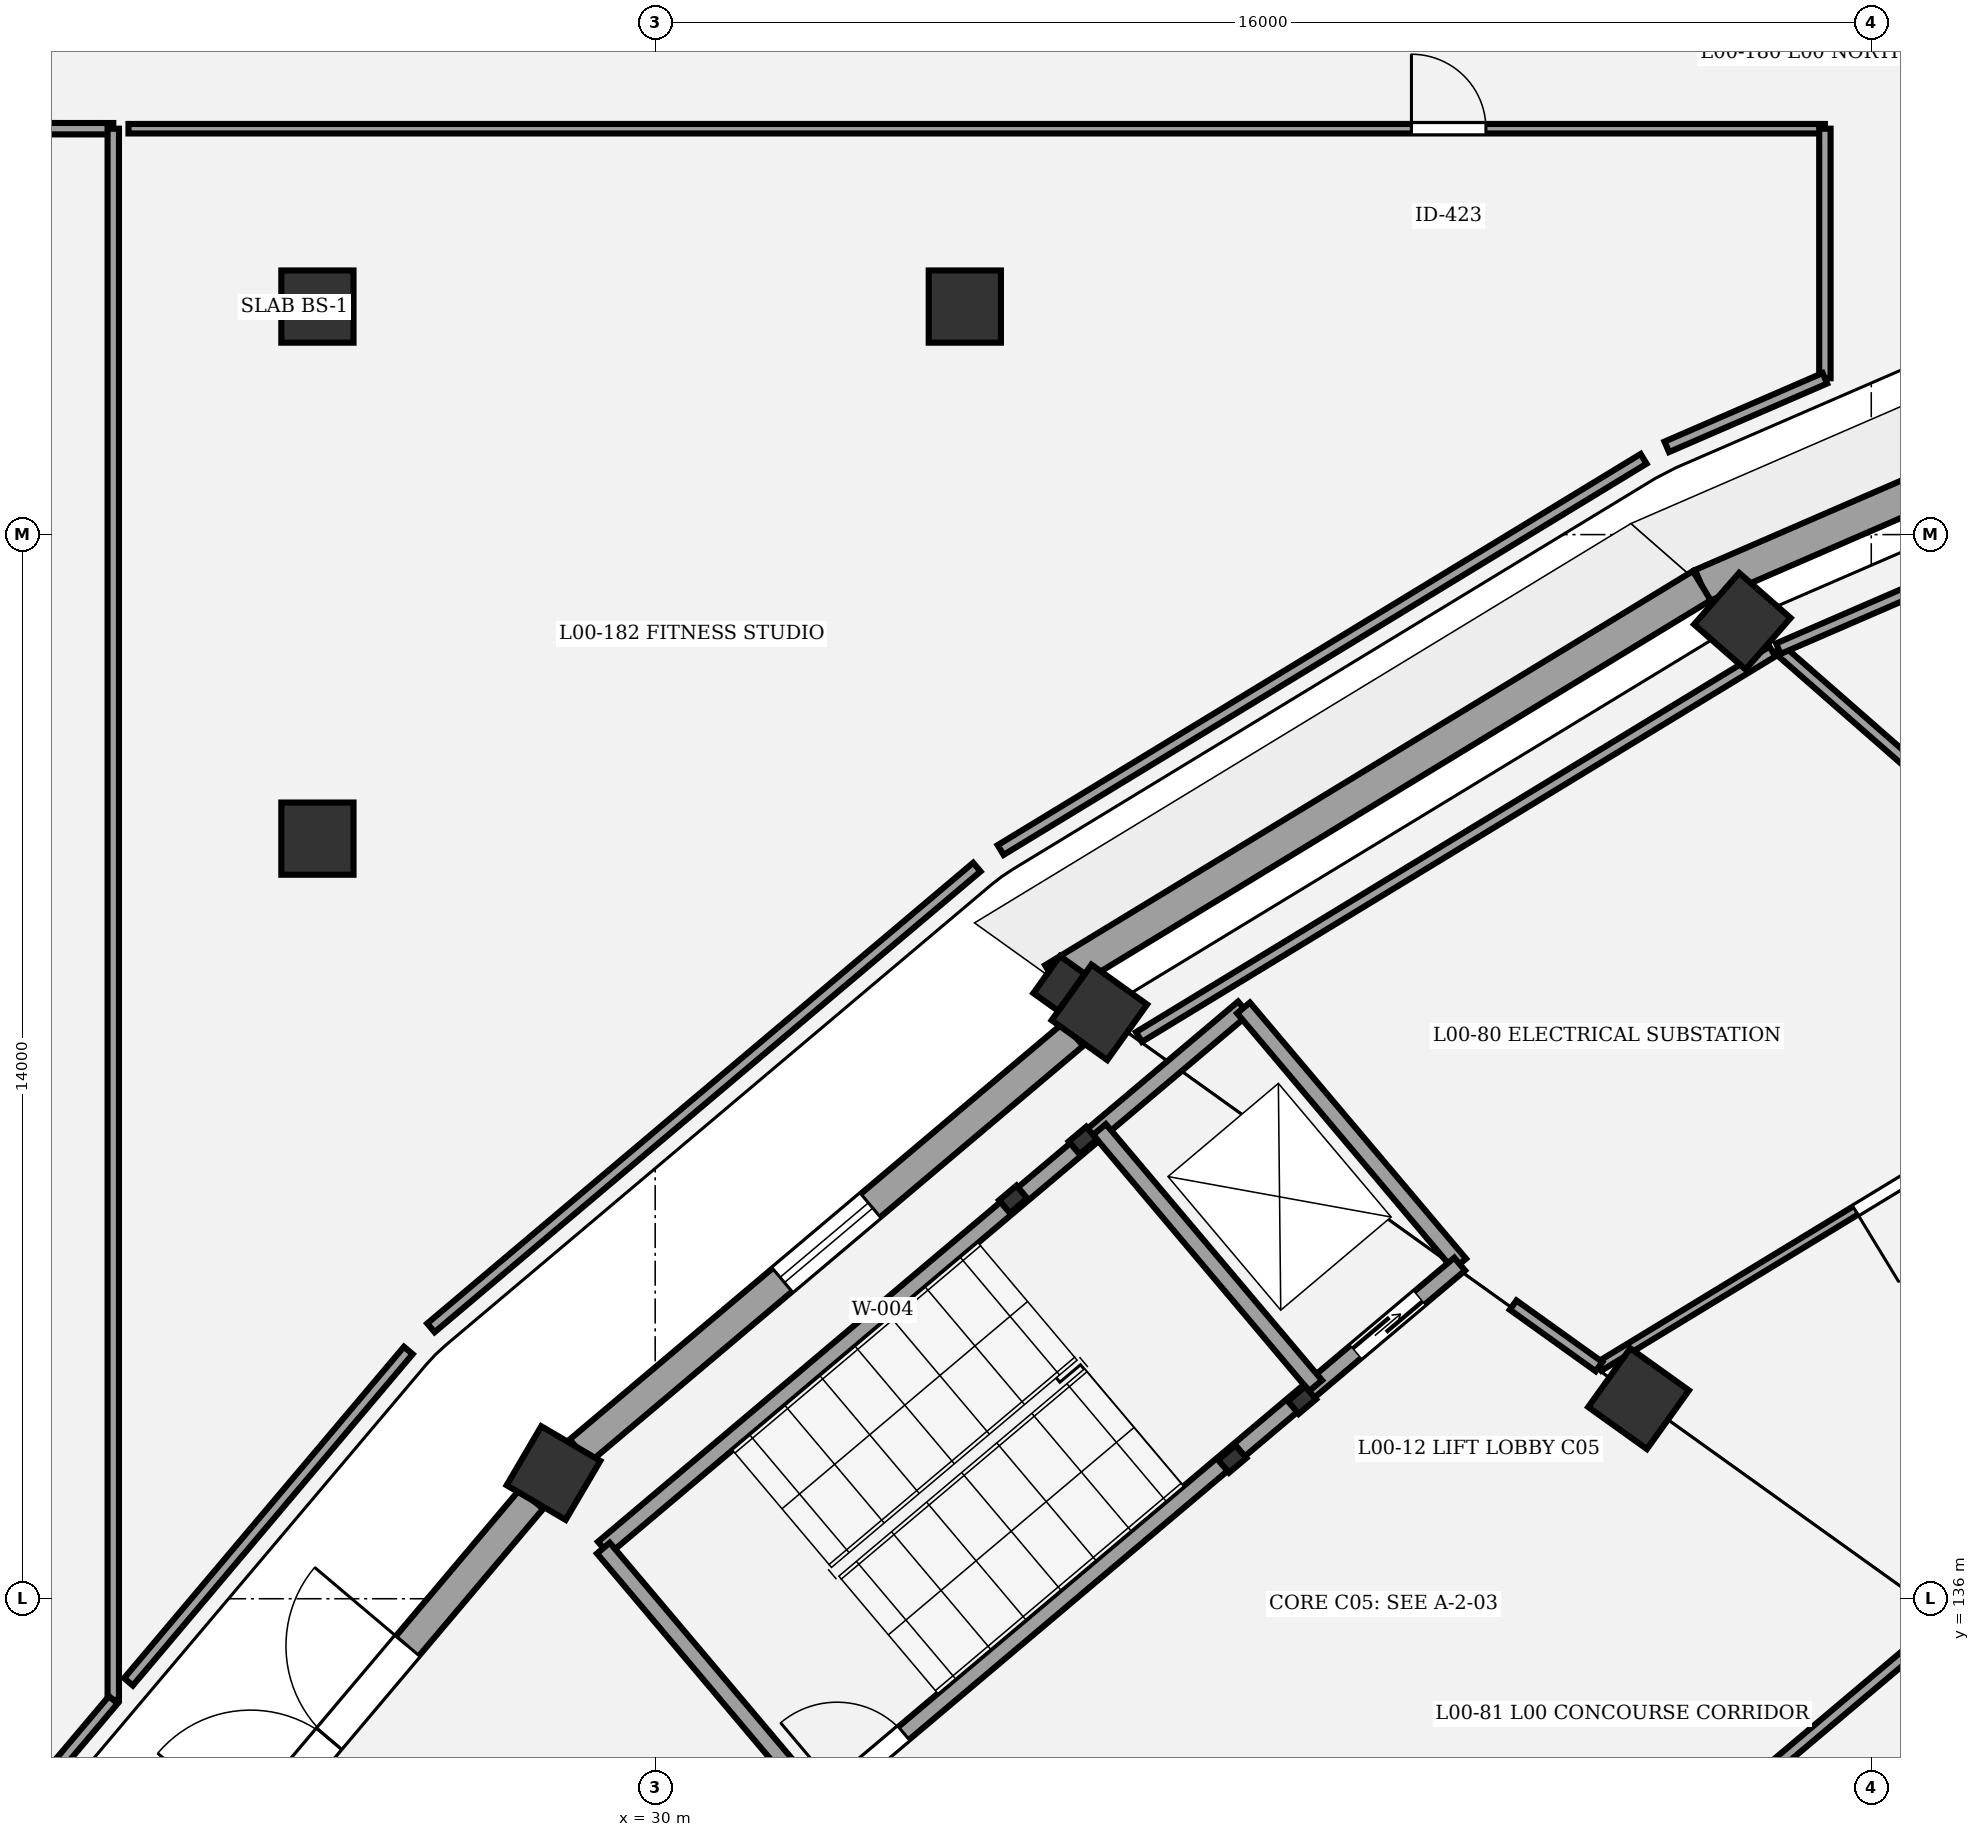
"""IFC4 building model, lengths in metres.
Left out: names, types, materials, properties, quantities, classifications, styles, units other than length and angle.
Written with IfcOpenShell. Run it as: python <this file> out.ifc"""

import sys

from ifc_helpers import new_model, si_unit, direction, frame, frame_2d, origin, origin_2d, place, context, subcontext, project, spatial, rectangle, circle, extrude, element, fill, save


model = new_model("IFC4")
c1 = context("Model", 3, precision=1e-05, world=origin(), true_north=direction((0.0, 1.0)))
c2 = subcontext(c1, "Body", "Model", "MODEL_VIEW")
j1 = project(units=[si_unit("LENGTHUNIT", "METRE"), si_unit("PLANEANGLEUNIT", "RADIAN")], contexts=[c1])
p1 = place(None, origin())
s1 = spatial("IfcSite", under=j1, at=p1, CompositionType="ELEMENT")
p2 = place(p1, origin())
s2 = spatial("IfcBuilding", under=s1, at=p2, CompositionType="ELEMENT")
p3 = place(p2, origin())
s3 = spatial("IfcBuildingStorey", under=s2, at=p3, CompositionType="ELEMENT", Elevation=0.0)
p4 = place(p3, frame((44.304, 148.861, 0.0), z_axis=(0.0, 0.0, 1.0), x_axis=(-0.752529860433, 0.658558128912, 0.0)))
e1 = element("IfcColumn", 1, at=p4, inside=s3, PredefinedType="COLUMN", context=c2, shape_type="SweptSolid", body=[
    extrude(rectangle(XDim=0.9, YDim=0.9, at=origin_2d()), origin(), (0.0, 0.0, 1.0), 5.4),
])
p5 = place(p3, frame((42.939, 138.632, 0.0), z_axis=(0.0, 0.0, 1.0), x_axis=(-0.812897512265, 0.582406760395, 0.0)))
e2 = element("IfcColumn", 2, at=p5, inside=s3, PredefinedType="COLUMN", context=c2, shape_type="SweptSolid", body=[
    extrude(rectangle(XDim=0.95, YDim=0.95, at=origin_2d()), origin(), (0.0, 0.0, 1.0), 5.4),
])
p6 = place(p3, frame((35.844, 143.715, 0.0), z_axis=(0.0, 0.0, 1.0), x_axis=(-0.812897512265, 0.582406760395, 0.0)))
e3 = element("IfcColumn", 3, at=p6, inside=s3, PredefinedType="COLUMN", context=c2, shape_type="SweptSolid", body=[
    extrude(rectangle(XDim=0.9, YDim=0.9, at=origin_2d()), origin(), (0.0, 0.0, 1.0), 5.4),
])
p7 = place(p3, frame((35.314, 144.095, 0.0), z_axis=(0.0, 0.0, 1.0), x_axis=(-0.582406760395, -0.812897512265, 0.0)))
e4 = element("IfcColumn", 4, at=p7, inside=s3, PredefinedType="PILASTER", context=c2, shape_type="SweptSolid", body=[
    extrude(rectangle(XDim=0.6, YDim=0.4, at=origin_2d()), origin(), (0.0, 0.0, 1.0), 5.4),
])
p8 = place(p3, frame((28.662, 137.654, 0.0), z_axis=(0.0, 0.0, 1.0), x_axis=(-0.862513669207, 0.506033764121, 0.0)))
e5 = element("IfcColumn", 5, at=p8, inside=s3, PredefinedType="COLUMN", context=c2, shape_type="SweptSolid", body=[
    extrude(rectangle(XDim=0.9, YDim=0.9, at=origin_2d()), origin(), (0.0, 0.0, 1.0), 5.4),
])
for number, where, z_axis, x_axis in (
    (6, (25.556, 146.0, 0.0), (0.0, 0.0, 1.0), (1.0, 0.0, 0.0)),
    (7, (25.556, 153.0, 0.0), (0.0, 0.0, 1.0), (1.0, 0.0, 0.0)),
    (8, (34.074, 153.0, 0.0), (0.0, 0.0, 1.0), (1.0, 0.0, 0.0)),
):
    element("IfcColumn", number, at=place(p3, frame(where, z_axis=z_axis, x_axis=x_axis)), inside=s3, PredefinedType="COLUMN", context=c2, shape_type="SweptSolid", body=[
        extrude(circle(Radius=0.475, at=origin_2d()), origin(), (0.0, 0.0, 1.0), 5.4),
    ])
p9 = place(p3, frame((53.603, 153.59, 0.0), z_axis=(0.0, 0.0, 1.0), x_axis=(-0.917502700529, -0.397729549471, 0.0)))
e9 = element("IfcWall", 9, at=p9, inside=s3, PredefinedType="USERDEFINED", context=c2, shape_type="SweptSolid", body=[
    extrude(rectangle(XDim=10.716, YDim=0.45, at=frame_2d((5.358, 0.0))), origin(), (0.0, 0.0, 1.0), 4.25),
])
p10 = place(p3, frame((43.77, 149.328, 0.0), z_axis=(0.0, 0.0, 1.0), x_axis=(-0.854319977813, -0.519747415106, 0.0)))
e10 = element("IfcWall", 10, at=p10, inside=s3, PredefinedType="USERDEFINED", context=c2, shape_type="SweptSolid", body=[
    extrude(rectangle(XDim=9.977, YDim=0.45, at=frame_2d((4.988, 0.0))), origin(), (0.0, 0.0, 1.0), 4.25),
])
p11 = place(p3, frame((29.004, 137.942, 0.0), z_axis=(0.0, 0.0, 1.0), x_axis=(0.764254773348, 0.644914445035, 0.0)))
e11 = element("IfcWall", 11, at=p11, inside=s3, PredefinedType="STANDARD", context=c2, shape_type="SweptSolid", body=[
    extrude(rectangle(XDim=8.502, YDim=0.4, at=frame_2d((4.251, 0.0))), origin(), (0.0, 0.0, 1.0), 4.25),
])
p12 = place(p11, frame((3.491, 0.0, 1.1)))
e12 = element("IfcOpeningElement", 12, at=p12, cuts=e11, PredefinedType="OPENING", context=c2, shape_type="SweptSolid", body=[
    extrude(rectangle(XDim=1.52, YDim=1.55, at=frame_2d((0.76, 0.775))), frame((0.0, 0.21, 0.0), z_axis=(0.0, -1.0, 0.0), x_axis=(1.0, 0.0, 0.0)), (0.0, 0.0, 1.0), 0.42),
])
p13 = place(p3, frame((23.046, 131.004, 0.0), z_axis=(0.0, 0.0, 1.0), x_axis=(0.645194244502, 0.764018577563, 0.0)))
e13 = element("IfcWall", 13, at=p13, inside=s3, PredefinedType="STANDARD", context=c2, shape_type="SweptSolid", body=[
    extrude(rectangle(XDim=8.256, YDim=0.4, at=frame_2d((4.128, 0.0))), origin(), (0.0, 0.0, 1.0), 4.25),
])
p14 = place(p13, frame((2.528, 0.0, 0.0)))
e14 = element("IfcOpeningElement", 14, at=p14, cuts=e13, PredefinedType="OPENING", context=c2, shape_type="SweptSolid", body=[
    extrude(rectangle(XDim=3.2, YDim=3.1, at=frame_2d((1.6, 1.55))), frame((0.0, 0.21, 0.0), z_axis=(0.0, -1.0, 0.0), x_axis=(1.0, 0.0, 0.0)), (0.0, 0.0, 1.0), 0.42),
])
for number, where, z_axis, x_axis in (
    (15, (37.593, 137.839, 0.0), (0.0, 0.0, 1.0), (0.764, 0.645, 0.0)),
    (16, (38.51, 138.613, 0.0), (0.0, 0.0, 1.0), (0.764, 0.645, 0.0)),
    (17, (35.627, 142.029, 0.0), (0.0, 0.0, 1.0), (0.764, 0.645, 0.0)),
    (18, (34.71, 141.255, 0.0), (0.0, 0.0, 1.0), (0.764, 0.645, 0.0)),
):
    element("IfcColumn", number, at=place(p3, frame(where, z_axis=z_axis, x_axis=x_axis)), inside=s3, PredefinedType="COLUMN", context=c2, shape_type="SweptSolid", body=[
        extrude(rectangle(XDim=0.3, YDim=0.22, at=origin_2d()), origin(), (0.0, 0.0, 1.0), 5.4),
    ])
p15 = place(p3, frame((29.319, 136.666, 0.0), z_axis=(0.0, 0.0, 1.0), x_axis=(0.764247804305, 0.644922703598, 0.0)))
e19 = element("IfcWall", 19, at=p15, inside=s3, PredefinedType="SHEAR", context=c2, shape_type="SweptSolid", body=[
    extrude(rectangle(XDim=11.02, YDim=0.22, at=frame_2d((5.51, 0.0))), origin(), (0.0, 0.0, 1.0), 5.15),
])
p16 = place(p3, frame((32.163, 133.296, 0.0), z_axis=(0.0, 0.0, 1.0), x_axis=(-0.644904288042, 0.764263344185, 0.0)))
e20 = element("IfcWall", 20, at=p16, inside=s3, PredefinedType="SHEAR", context=c2, shape_type="SweptSolid", body=[
    extrude(rectangle(XDim=4.41, YDim=0.22, at=frame_2d((2.205, 0.0))), origin(), (0.0, 0.0, 1.0), 5.15),
])
p17 = place(p3, frame((40.585, 140.403, 0.0), z_axis=(0.0, 0.0, 1.0), x_axis=(-0.644936622785, 0.764236058159, 0.0)))
e21 = element("IfcWall", 21, at=p17, inside=s3, PredefinedType="SHEAR", context=c2, shape_type="SweptSolid", body=[
    extrude(rectangle(XDim=4.41, YDim=0.22, at=frame_2d((2.205, 0.0))), origin(), (0.0, 0.0, 1.0), 5.15),
])
p18 = place(p3, frame((32.163, 133.296, 0.0), z_axis=(0.0, 0.0, 1.0), x_axis=(0.764257018762, 0.644911784102, 0.0)))
e22 = element("IfcWall", 22, at=p18, inside=s3, PredefinedType="SHEAR", context=c2, shape_type="SweptSolid", body=[
    extrude(rectangle(XDim=11.02, YDim=0.22, at=frame_2d((5.51, 0.0))), origin(), (0.0, 0.0, 1.0), 5.15),
])
p19 = place(p18, frame((0.3, 0.0, 0.0)))
e23 = element("IfcOpeningElement", 23, at=p19, cuts=e22, PredefinedType="OPENING", context=c2, shape_type="SweptSolid", body=[
    extrude(rectangle(XDim=1.15, YDim=2.15, at=frame_2d((0.575, 1.075))), frame((0.0, 0.12, 0.0), z_axis=(0.0, -1.0, 0.0), x_axis=(1.0, 0.0, 0.0)), (0.0, 0.0, 1.0), 0.24),
])
p20 = place(p18, frame((9.23, 0.0, 0.0)))
e24 = element("IfcOpeningElement", 24, at=p20, cuts=e22, PredefinedType="OPENING", context=c2, shape_type="SweptSolid", body=[
    extrude(rectangle(XDim=1.1, YDim=2.15, at=frame_2d((0.55, 1.075))), frame((0.0, 0.12, 0.0), z_axis=(0.0, -1.0, 0.0), x_axis=(1.0, 0.0, 0.0)), (0.0, 0.0, 1.0), 0.24),
])
p21 = place(p3, frame((38.689, 138.803, 0.0), z_axis=(0.0, 0.0, 1.0), x_axis=(-0.644904288042, 0.764263344185, 0.0)))
e25 = element("IfcWall", 25, at=p21, inside=s3, PredefinedType="SHEAR", context=c2, shape_type="SweptSolid", body=[
    extrude(rectangle(XDim=4.41, YDim=0.22, at=frame_2d((2.205, 0.0))), origin(), (0.0, 0.0, 1.0), 5.15),
])
p22 = place(p3, frame((50.105, 143.731, 0.0), z_axis=(0.0, 0.0, 1.0), x_axis=(-0.854321649351, -0.519744667554, 0.0)))
e26 = element("IfcWall", 26, at=p22, inside=s3, PredefinedType="PARTITIONING", context=c2, shape_type="SweptSolid", body=[
    extrude(rectangle(XDim=8.999, YDim=0.125, at=frame_2d((4.499, 0.0))), origin(), (0.0, 0.0, 1.0), 4.15),
])
p23 = place(p22, frame((3.949, 0.0, 0.0)))
e27 = element("IfcOpeningElement", 27, at=p23, cuts=e26, PredefinedType="OPENING", context=c2, shape_type="SweptSolid", body=[
    extrude(rectangle(XDim=1.1, YDim=2.3, at=frame_2d((0.55, 1.15))), frame((0.0, 0.073, 0.0), z_axis=(0.0, -1.0, 0.0), x_axis=(1.0, 0.0, 0.0)), (0.0, 0.0, 1.0), 0.145),
])
p24 = place(p3, frame((40.867, 130.539, 0.0), z_axis=(0.0, 0.0, 1.0), x_axis=(0.764249122867, 0.644921141068, 0.0)))
e28 = element("IfcWall", 28, at=p24, inside=s3, PredefinedType="PARTITIONING", context=c2, shape_type="SweptSolid", body=[
    extrude(rectangle(XDim=7.99, YDim=0.15, at=frame_2d((3.995, 0.0))), origin(), (0.0, 0.0, 1.0), 4.15),
])
p25 = place(p24, frame((1.562, 0.0, 0.0)))
e29 = element("IfcOpeningElement", 29, at=p25, cuts=e28, PredefinedType="OPENING", context=c2, shape_type="SweptSolid", body=[
    extrude(rectangle(XDim=1.14, YDim=2.3, at=frame_2d((0.57, 1.15))), frame((0.0, 0.085, 0.0), z_axis=(0.0, -1.0, 0.0), x_axis=(1.0, 0.0, 0.0)), (0.0, 0.0, 1.0), 0.17),
])
p26 = place(p3, frame((13.469, 155.343, 0.0), z_axis=(0.0, 0.0, 1.0), x_axis=(0.999999951445, -0.000311623544, 0.0)))
e30 = element("IfcWall", 30, at=p26, inside=s3, PredefinedType="PARTITIONING", context=c2, shape_type="SweptSolid", body=[
    extrude(rectangle(XDim=9.401, YDim=0.15, at=frame_2d((4.701, 0.0))), origin(), (0.0, 0.0, 1.0), 4.15),
])
p27 = place(p26, frame((7.203, 0.0, 0.0)))
e31 = element("IfcOpeningElement", 31, at=p27, cuts=e30, PredefinedType="OPENING", context=c2, shape_type="SweptSolid", body=[
    extrude(rectangle(XDim=0.94, YDim=2.3, at=frame_2d((0.47, 1.15))), frame((0.0, 0.085, 0.0), z_axis=(0.0, -1.0, 0.0), x_axis=(1.0, 0.0, 0.0)), (0.0, 0.0, 1.0), 0.17),
])
p28 = place(p3, frame((23.07, 155.34, 0.0), z_axis=(0.0, 0.0, 1.0), x_axis=(1.0, 0.0, 0.0)))
e32 = element("IfcWall", 32, at=p28, inside=s3, PredefinedType="PARTITIONING", context=c2, shape_type="SweptSolid", body=[
    extrude(rectangle(XDim=22.32, YDim=0.125, at=frame_2d((11.16, 0.0))), origin(), (0.0, 0.0, 1.0), 4.15),
])
p29 = place(p28, frame((16.88, 0.0, 0.0)))
e33 = element("IfcOpeningElement", 33, at=p29, cuts=e32, PredefinedType="OPENING", context=c2, shape_type="SweptSolid", body=[
    extrude(rectangle(XDim=0.98, YDim=2.3, at=frame_2d((0.49, 1.15))), frame((0.0, 0.073, 0.0), z_axis=(0.0, -1.0, 0.0), x_axis=(1.0, 0.0, 0.0)), (0.0, 0.0, 1.0), 0.145),
])
p30 = place(p3, frame((50.18, 143.772, 0.0), z_axis=(0.0, 0.0, 1.0), x_axis=(-0.752576694707, 0.658504607869, 0.0)))
e34 = element("IfcWall", 34, at=p30, inside=s3, PredefinedType="PARTITIONING", context=c2, shape_type="SweptSolid", body=[
    extrude(rectangle(XDim=7.178, YDim=0.15, at=frame_2d((3.589, 0.0))), origin(), (0.0, 0.0, 1.0), 4.15),
])
p31 = place(p3, frame((44.778, 148.499, 0.0), z_axis=(0.0, 0.0, 1.0), x_axis=(0.917505556499, 0.397722961109, 0.0)))
e35 = element("IfcWall", 35, at=p31, inside=s3, PredefinedType="PARTITIONING", context=c2, shape_type="SweptSolid", body=[
    extrude(rectangle(XDim=9.845, YDim=0.15, at=frame_2d((4.922, 0.0))), origin(), (0.0, 0.0, 1.0), 4.15),
])
p32 = place(p3, frame((36.365, 143.391, 0.0), z_axis=(0.0, 0.0, 1.0), x_axis=(0.854323689683, 0.519741313777, 0.0)))
e36 = element("IfcWall", 36, at=p32, inside=s3, PredefinedType="PARTITIONING", context=c2, shape_type="SweptSolid", body=[
    extrude(rectangle(XDim=9.756, YDim=0.15, at=frame_2d((4.878, 0.0))), origin(), (0.0, 0.0, 1.0), 4.15),
])
p33 = place(p3, frame((42.418, 139.054, 0.0), z_axis=(0.0, 0.0, 1.0), x_axis=(-0.812925279681, 0.582368001916, 0.0)))
e37 = element("IfcWall", 37, at=p33, inside=s3, PredefinedType="PARTITIONING", context=c2, shape_type="SweptSolid", body=[
    extrude(rectangle(XDim=1.389, YDim=0.15, at=frame_2d((0.695, 0.0))), origin(), (0.0, 0.0, 1.0), 4.15),
])
p34 = place(p3, frame((22.87, 155.34, 0.0), z_axis=(0.0, 0.0, 1.0), x_axis=(0.0, -1.0, 0.0)))
e38 = element("IfcWall", 38, at=p34, inside=s3, PredefinedType="PARTITIONING", context=c2, shape_type="SweptSolid", body=[
    extrude(rectangle(XDim=20.67, YDim=0.15, at=frame_2d((10.335, 0.0))), origin(), (0.0, 0.0, 1.0), 4.15),
])
p35 = place(p3, frame((22.87, 134.67, 0.0), z_axis=(0.0, 0.0, 1.0), x_axis=(-0.64518788911, -0.764023944485, 0.0)))
e39 = element("IfcWall", 39, at=p35, inside=s3, PredefinedType="PARTITIONING", context=c2, shape_type="SweptSolid", body=[
    extrude(rectangle(XDim=3.135, YDim=0.15, at=frame_2d((1.567, 0.0))), origin(), (0.0, 0.0, 1.0), 4.15),
])
p36 = place(p3, frame((43.004, 150.997, 0.0), z_axis=(0.0, 0.0, 1.0), x_axis=(-0.854333268174, -0.519725568826, 0.0)))
e40 = element("IfcWall", 40, at=p36, inside=s3, PredefinedType="PARTITIONING", context=c2, shape_type="SweptSolid", body=[
    extrude(rectangle(XDim=9.902, YDim=0.15, at=frame_2d((4.951, 0.0))), origin(), (0.0, 0.0, 1.0), 4.15),
])
p37 = place(p3, frame((34.232, 145.625, 0.0), z_axis=(0.0, 0.0, 1.0), x_axis=(-0.76426547638, -0.644901761212, 0.0)))
e41 = element("IfcWall", 41, at=p37, inside=s3, PredefinedType="PARTITIONING", context=c2, shape_type="SweptSolid", body=[
    extrude(rectangle(XDim=9.398, YDim=0.15, at=frame_2d((4.699, 0.0))), origin(), (0.0, 0.0, 1.0), 4.15),
])
p38 = place(p3, frame((26.752, 139.266, 0.0), z_axis=(0.0, 0.0, 1.0), x_axis=(-0.645178597855, -0.764031790484, 0.0)))
e42 = element("IfcWall", 42, at=p38, inside=s3, PredefinedType="PARTITIONING", context=c2, shape_type="SweptSolid", body=[
    extrude(rectangle(XDim=5.706, YDim=0.15, at=frame_2d((2.853, 0.0))), origin(), (0.0, 0.0, 1.0), 4.15),
])
p39 = place(p3, frame((45.39, 155.34, 0.0), z_axis=(0.0, 0.0, 1.0), x_axis=(0.0, -1.0, 0.0)))
e43 = element("IfcWall", 43, at=p39, inside=s3, PredefinedType="PARTITIONING", context=c2, shape_type="SweptSolid", body=[
    extrude(rectangle(XDim=3.283, YDim=0.15, at=frame_2d((1.642, 0.0))), origin(), (0.0, 0.0, 1.0), 4.15),
])
p40 = place(p3, frame((45.39, 152.057, 0.0), z_axis=(0.0, 0.0, 1.0), x_axis=(-0.917454774934, -0.397840088415, 0.0)))
e44 = element("IfcWall", 44, at=p40, inside=s3, PredefinedType="PARTITIONING", context=c2, shape_type="SweptSolid", body=[
    extrude(rectangle(XDim=2.268, YDim=0.15, at=frame_2d((1.134, 0.0))), origin(), (0.0, 0.0, 1.0), 4.15),
])
p41 = place(p12, origin())
e45 = element("IfcWindow", 45, at=p41, inside=s3, PartitioningType="SINGLE_PANEL", PredefinedType="WINDOW", context=c2, shape_type="SweptSolid", body=[
    extrude(rectangle(XDim=1.52, YDim=1.55, at=frame_2d((0.76, 0.775))), frame((0.0, 0.03, 0.0), z_axis=(0.0, -1.0, 0.0), x_axis=(1.0, 0.0, 0.0)), (0.0, 0.0, 1.0), 0.06),
])
fill(e12, e45)
p42 = place(p14, origin())
e46 = element("IfcDoor", 46, at=p42, inside=s3, OperationType="DOUBLE_DOOR_SINGLE_SWING", PredefinedType="GATE", context=c2, shape_type="SweptSolid", body=[
    extrude(rectangle(XDim=3.2, YDim=3.1, at=frame_2d((1.6, 1.55))), frame((0.0, 0.025, 0.0), z_axis=(0.0, -1.0, 0.0), x_axis=(1.0, 0.0, 0.0)), (0.0, 0.0, 1.0), 0.05),
])
fill(e14, e46)
p43 = place(p19, origin())
e47 = element("IfcDoor", 47, at=p43, inside=s3, OperationType="SINGLE_SWING_LEFT", PredefinedType="DOOR", context=c2, shape_type="SweptSolid", body=[
    extrude(rectangle(XDim=1.15, YDim=2.15, at=frame_2d((0.575, 1.075))), frame((0.0, 0.025, 0.0), z_axis=(0.0, -1.0, 0.0), x_axis=(1.0, 0.0, 0.0)), (0.0, 0.0, 1.0), 0.05),
])
fill(e23, e47)
p44 = place(p20, origin())
e48 = element("IfcDoor", 48, at=p44, inside=s3, OperationType="DOUBLE_DOOR_SLIDING", PredefinedType="DOOR", context=c2, shape_type="SweptSolid", body=[
    extrude(rectangle(XDim=1.1, YDim=2.15, at=frame_2d((0.55, 1.075))), frame((0.0, 0.025, 0.0), z_axis=(0.0, -1.0, 0.0), x_axis=(1.0, 0.0, 0.0)), (0.0, 0.0, 1.0), 0.05),
])
fill(e24, e48)
p45 = place(p23, origin())
e49 = element("IfcDoor", 49, at=p45, inside=s3, OperationType="SINGLE_SWING_RIGHT", PredefinedType="DOOR", context=c2, shape_type="SweptSolid", body=[
    extrude(rectangle(XDim=1.1, YDim=2.3, at=frame_2d((0.55, 1.15))), frame((0.0, 0.025, 0.0), z_axis=(0.0, -1.0, 0.0), x_axis=(1.0, 0.0, 0.0)), (0.0, 0.0, 1.0), 0.05),
])
fill(e27, e49)
p46 = place(p29, origin())
e50 = element("IfcDoor", 50, at=p46, inside=s3, OperationType="SINGLE_SWING_LEFT", PredefinedType="DOOR", context=c2, shape_type="SweptSolid", body=[
    extrude(rectangle(XDim=0.98, YDim=2.3, at=frame_2d((0.49, 1.15))), frame((0.0, 0.025, 0.0), z_axis=(0.0, -1.0, 0.0), x_axis=(1.0, 0.0, 0.0)), (0.0, 0.0, 1.0), 0.05),
])
fill(e33, e50)
save(model, sys.argv[1])
